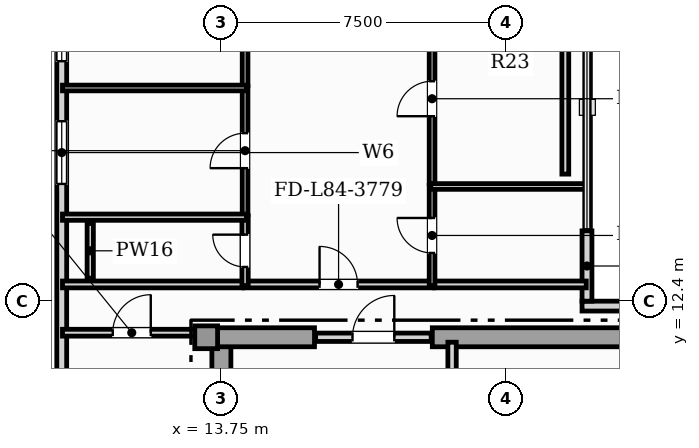
"""IFC4 building model, lengths in metres.
Left out: names, types, materials, properties, quantities, classifications, styles, units other than length and angle.
Written with IfcOpenShell. Run it as: python <this file> out.ifc"""

import sys

from ifc_helpers import new_model, si_unit, direction, frame, frame_2d, origin, origin_2d, place, context, subcontext, project, spatial, rectangle, extrude, element, fill, save


model = new_model("IFC4")
c1 = context("Model", 3, precision=1e-05, world=origin(), true_north=direction((0.0, 1.0)))
c2 = subcontext(c1, "Body", "Model", "MODEL_VIEW")
j1 = project(units=[si_unit("LENGTHUNIT", "METRE"), si_unit("PLANEANGLEUNIT", "RADIAN")], contexts=[c1])
p1 = place(None, origin())
s1 = spatial("IfcSite", under=j1, at=p1, CompositionType="ELEMENT")
p2 = place(p1, origin())
s2 = spatial("IfcBuilding", under=s1, at=p2, CompositionType="ELEMENT")
p3 = place(p2, frame((0.0, 0.0, 341.35)))
s3 = spatial("IfcBuildingStorey", under=s2, at=p3, CompositionType="ELEMENT", Elevation=341.35)
p4 = place(p3, frame((13.75, 0.92, 0.0), z_axis=(0.0, 0.0, 1.0), x_axis=(0.0, 1.0, 0.0)))
e1 = element("IfcWall", 1, at=p4, inside=s3, PredefinedType="SHEAR", context=c2, shape_type="SweptSolid", body=[
    extrude(rectangle(XDim=10.53, YDim=0.5, at=frame_2d((5.265, 0.0))), origin(), (0.0, 0.0, 1.0), 3.63),
])
p5 = place(p3, frame((13.25, 11.45, 0.0), z_axis=(0.0, 0.0, 1.0), x_axis=(1.0, 0.0, 0.0)))
e2 = element("IfcWall", 2, at=p5, inside=s3, PredefinedType="SHEAR", context=c2, shape_type="SweptSolid", body=[
    extrude(rectangle(XDim=2.95, YDim=0.5, at=frame_2d((1.475, 0.0))), origin(), (0.0, 0.0, 1.0), 3.63),
])
p6 = place(p3, frame((19.3, 11.45, 0.0), z_axis=(0.0, 0.0, 1.0), x_axis=(1.0, 0.0, 0.0)))
e3 = element("IfcWall", 3, at=p6, inside=s3, PredefinedType="SHEAR", context=c2, shape_type="SweptSolid", body=[
    extrude(rectangle(XDim=7.3, YDim=0.5, at=frame_2d((3.65, 0.0))), origin(), (0.0, 0.0, 1.0), 3.63),
])
p7 = place(p3, frame((13.35, 11.45, 0.0), z_axis=(0.0, 0.0, 1.0), x_axis=(1.0, 0.0, 0.0)))
e4 = element("IfcColumn", 4, at=p7, inside=s3, PredefinedType="COLUMN", context=c2, shape_type="SweptSolid", body=[
    extrude(rectangle(XDim=0.6, YDim=0.6, at=origin_2d()), origin(), (0.0, 0.0, 1.0), 3.85),
])
p8 = place(p3, frame((34.26, 12.27, 0.0), z_axis=(0.0, 0.0, 1.0), x_axis=(-1.0, 0.0, 0.0)))
e5 = element("IfcWall", 5, at=p8, inside=s3, PredefinedType="SOLIDWALL", context=c2, shape_type="SweptSolid", body=[
    extrude(rectangle(XDim=11.02, YDim=0.26, at=frame_2d((5.51, 0.0))), origin(), (0.0, 0.0, 1.0), 3.63),
])
p9 = place(p3, frame((23.37, 12.4, 0.0), z_axis=(0.0, 0.0, 1.0), x_axis=(0.0, 1.0, 0.0)))
e6 = element("IfcWall", 6, at=p9, inside=s3, PredefinedType="SOLIDWALL", context=c2, shape_type="SweptSolid", body=[
    extrude(rectangle(XDim=1.85, YDim=0.26, at=frame_2d((0.925, 0.0))), origin(), (0.0, 0.0, 1.0), 3.17),
])
p10 = place(p3, frame((9.55, 28.408, 0.0), z_axis=(0.0, 0.0, 1.0), x_axis=(0.0, -1.0, 0.0)))
e7 = element("IfcWall", 7, at=p10, inside=s3, PredefinedType="SOLIDWALL", context=c2, shape_type="SweptSolid", body=[
    extrude(rectangle(XDim=25.168, YDim=0.26, at=frame_2d((12.584, 0.0))), origin(), (0.0, 0.0, 1.0), 3.63),
])
p11 = place(p10, frame((19.503, 0.0, 0.88)))
e8 = element("IfcOpeningElement", 8, at=p11, cuts=e7, PredefinedType="OPENING", context=c2, shape_type="SweptSolid", body=[
    extrude(rectangle(XDim=1.65, YDim=2.0, at=frame_2d((0.825, 1.0))), frame((0.0, 0.14, 0.0), z_axis=(0.0, -1.0, 0.0), x_axis=(1.0, 0.0, 0.0)), (0.0, 0.0, 1.0), 0.28),
])
p12 = place(p10, frame((2.77, 0.0, 0.95)))
e9 = element("IfcOpeningElement", 9, at=p12, cuts=e7, PredefinedType="OPENING", context=c2, shape_type="SweptSolid", body=[
    extrude(rectangle(XDim=0.9, YDim=1.5, at=frame_2d((0.45, 0.75))), frame((0.0, 0.14, 0.0), z_axis=(0.0, -1.0, 0.0), x_axis=(1.0, 0.0, 0.0)), (0.0, 0.0, 1.0), 0.28),
])
p13 = place(p10, frame((11.274, 0.0, 0.88)))
e10 = element("IfcOpeningElement", 10, at=p13, cuts=e7, PredefinedType="OPENING", context=c2, shape_type="SweptSolid", body=[
    extrude(rectangle(XDim=1.65, YDim=2.0, at=frame_2d((0.825, 1.0))), frame((0.0, 0.14, 0.0), z_axis=(0.0, -1.0, 0.0), x_axis=(1.0, 0.0, 0.0)), (0.0, 0.0, 1.0), 0.28),
])
p14 = place(p10, frame((8.044, 0.0, 0.88)))
e11 = element("IfcOpeningElement", 11, at=p14, cuts=e7, PredefinedType="OPENING", context=c2, shape_type="SweptSolid", body=[
    extrude(rectangle(XDim=1.65, YDim=2.0, at=frame_2d((0.825, 1.0))), frame((0.0, 0.14, 0.0), z_axis=(0.0, -1.0, 0.0), x_axis=(1.0, 0.0, 0.0)), (0.0, 0.0, 1.0), 0.28),
])
p15 = place(p10, frame((4.815, 0.0, 0.88)))
e12 = element("IfcOpeningElement", 12, at=p15, cuts=e7, PredefinedType="OPENING", context=c2, shape_type="SweptSolid", body=[
    extrude(rectangle(XDim=1.65, YDim=2.0, at=frame_2d((0.825, 1.0))), frame((0.0, 0.14, 0.0), z_axis=(0.0, -1.0, 0.0), x_axis=(1.0, 0.0, 0.0)), (0.0, 0.0, 1.0), 0.28),
])
p16 = place(p3, frame((19.82, 8.52, 0.0), z_axis=(0.0, 0.0, 1.0), x_axis=(0.0, 1.0, 0.0)))
e13 = element("IfcWall", 13, at=p16, inside=s3, PredefinedType="SOLIDWALL", context=c2, shape_type="SweptSolid", body=[
    extrude(rectangle(XDim=2.8, YDim=0.22, at=frame_2d((1.4, 0.0))), origin(), (0.0, 0.0, 1.0), 3.085),
])
p17 = place(p16, frame((0.85, 0.0, 0.0)))
e14 = element("IfcOpeningElement", 14, at=p17, cuts=e13, PredefinedType="OPENING", context=c2, shape_type="SweptSolid", body=[
    extrude(rectangle(XDim=1.1, YDim=2.2, at=frame_2d((0.55, 1.1))), frame((0.0, 0.12, 0.0), z_axis=(0.0, -1.0, 0.0), x_axis=(1.0, 0.0, 0.0)), (0.0, 0.0, 1.0), 0.24),
])
p18 = place(p3, frame((16.23, 11.45, 0.0), z_axis=(0.0, 0.0, 1.0), x_axis=(1.0, 0.0, 0.0)))
e15 = element("IfcWall", 15, at=p18, inside=s3, PredefinedType="SOLIDWALL", context=c2, shape_type="SweptSolid", body=[
    extrude(rectangle(XDim=3.04, YDim=0.22, at=frame_2d((1.52, 0.0))), origin(), (0.0, 0.0, 1.0), 3.63),
])
p19 = place(p18, frame((0.97, 0.0, 0.0)))
e16 = element("IfcOpeningElement", 16, at=p19, cuts=e15, PredefinedType="OPENING", context=c2, shape_type="SweptSolid", body=[
    extrude(rectangle(XDim=1.1, YDim=2.2, at=frame_2d((0.55, 1.1))), frame((0.0, 0.12, 0.0), z_axis=(0.0, -1.0, 0.0), x_axis=(1.0, 0.0, 0.0)), (0.0, 0.0, 1.0), 0.24),
])
p20 = place(p3, frame((9.569, 11.57, 0.0), z_axis=(0.0, 0.0, 1.0), x_axis=(1.0, 0.0, 0.0)))
e17 = element("IfcWall", 17, at=p20, inside=s3, PredefinedType="PARTITIONING", context=c2, shape_type="SweptSolid", body=[
    extrude(rectangle(XDim=3.646, YDim=0.18, at=frame_2d((1.823, 0.0))), origin(), (0.0, 0.0, 1.0), 3.63),
])
p21 = place(p20, frame((1.323, 0.0, 0.0)))
e18 = element("IfcOpeningElement", 18, at=p21, cuts=e17, PredefinedType="OPENING", context=c2, shape_type="SweptSolid", body=[
    extrude(rectangle(XDim=1.0, YDim=2.15, at=frame_2d((0.5, 1.075))), frame((0.0, 0.1, 0.0), z_axis=(0.0, -1.0, 0.0), x_axis=(1.0, 0.0, 0.0)), (0.0, 0.0, 1.0), 0.2),
])
p22 = place(p3, frame((14.339, 12.84, 0.0), z_axis=(0.0, 0.0, 1.0), x_axis=(1.0, 0.0, 0.0)))
e19 = element("IfcWall", 19, at=p22, inside=s3, PredefinedType="PARTITIONING", context=c2, shape_type="SweptSolid", body=[
    extrude(rectangle(XDim=4.99, YDim=0.18, at=frame_2d((2.495, 0.0))), origin(), (0.0, 0.0, 1.0), 3.63),
])
p23 = place(p22, frame((1.995, 0.0, 0.0)))
e20 = element("IfcOpeningElement", 20, at=p23, cuts=e19, PredefinedType="OPENING", context=c2, shape_type="SweptSolid", body=[
    extrude(rectangle(XDim=1.0, YDim=2.15, at=frame_2d((0.5, 1.075))), frame((0.0, 0.1, 0.0), z_axis=(0.0, -1.0, 0.0), x_axis=(1.0, 0.0, 0.0)), (0.0, 0.0, 1.0), 0.2),
])
p24 = place(p3, frame((9.569, 12.84, 0.0), z_axis=(0.0, 0.0, 1.0), x_axis=(1.0, 0.0, 0.0)))
e21 = element("IfcWall", 21, at=p24, inside=s3, PredefinedType="PARTITIONING", context=c2, shape_type="SweptSolid", body=[
    extrude(rectangle(XDim=4.74, YDim=0.18, at=frame_2d((2.37, 0.0))), origin(), (0.0, 0.0, 1.0), 3.63),
])
p25 = place(p3, frame((19.359, 12.84, 0.0), z_axis=(0.0, 0.0, 1.0), x_axis=(1.0, 0.0, 0.0)))
e22 = element("IfcWall", 22, at=p25, inside=s3, PredefinedType="PARTITIONING", context=c2, shape_type="SweptSolid", body=[
    extrude(rectangle(XDim=3.992, YDim=0.18, at=frame_2d((1.996, 0.0))), origin(), (0.0, 0.0, 1.0), 3.63),
])
p26 = place(p3, frame((14.374, 12.805, 0.0), z_axis=(0.0, 0.0, 1.0), x_axis=(0.0, 1.0, 0.0)))
e23 = element("IfcWall", 23, at=p26, inside=s3, PredefinedType="PLUMBINGWALL", context=c2, shape_type="SweptSolid", body=[
    extrude(rectangle(XDim=1.84, YDim=0.165, at=frame_2d((0.92, 0.0))), origin(), (0.0, 0.0, 1.0), 3.63),
])
p27 = place(p26, frame((0.495, 0.0, 0.0)))
e24 = element("IfcOpeningElement", 24, at=p27, cuts=e23, PredefinedType="OPENING", context=c2, shape_type="SweptSolid", body=[
    extrude(rectangle(XDim=0.85, YDim=2.1, at=frame_2d((0.425, 1.05))), frame((0.0, 0.093, 0.0), z_axis=(0.0, -1.0, 0.0), x_axis=(1.0, 0.0, 0.0)), (0.0, 0.0, 1.0), 0.185),
])
p28 = place(p3, frame((14.374, 14.675, 0.0), z_axis=(0.0, 0.0, 1.0), x_axis=(0.0, 1.0, 0.0)))
e25 = element("IfcWall", 25, at=p28, inside=s3, PredefinedType="PARTITIONING", context=c2, shape_type="SweptSolid", body=[
    extrude(rectangle(XDim=3.369, YDim=0.15, at=frame_2d((1.685, 0.0))), origin(), (0.0, 0.0, 1.0), 3.63),
])
p29 = place(p28, frame((1.225, 0.0, 0.0)))
e26 = element("IfcOpeningElement", 26, at=p29, cuts=e25, PredefinedType="OPENING", context=c2, shape_type="SweptSolid", body=[
    extrude(rectangle(XDim=0.92, YDim=2.1, at=frame_2d((0.46, 1.05))), frame((0.0, 0.085, 0.0), z_axis=(0.0, -1.0, 0.0), x_axis=(1.0, 0.0, 0.0)), (0.0, 0.0, 1.0), 0.17),
])
p30 = place(p3, frame((14.374, 18.074, 0.0), z_axis=(0.0, 0.0, 1.0), x_axis=(0.0, 1.0, 0.0)))
e27 = element("IfcWall", 27, at=p30, inside=s3, PredefinedType="PARTITIONING", context=c2, shape_type="SweptSolid", body=[
    extrude(rectangle(XDim=3.03, YDim=0.15, at=frame_2d((1.515, 0.0))), origin(), (0.0, 0.0, 1.0), 3.63),
])
p31 = place(p30, frame((1.055, 0.0, 0.0)))
e28 = element("IfcOpeningElement", 28, at=p31, cuts=e27, PredefinedType="OPENING", context=c2, shape_type="SweptSolid", body=[
    extrude(rectangle(XDim=0.92, YDim=2.1, at=frame_2d((0.46, 1.05))), frame((0.0, 0.085, 0.0), z_axis=(0.0, -1.0, 0.0), x_axis=(1.0, 0.0, 0.0)), (0.0, 0.0, 1.0), 0.17),
])
p32 = place(p3, frame((19.294, 12.805, 0.0), z_axis=(0.0, 0.0, 1.0), x_axis=(0.0, 1.0, 0.0)))
e29 = element("IfcWall", 29, at=p32, inside=s3, PredefinedType="PARTITIONING", context=c2, shape_type="SweptSolid", body=[
    extrude(rectangle(XDim=2.648, YDim=0.15, at=frame_2d((1.324, 0.0))), origin(), (0.0, 0.0, 1.0), 3.63),
])
p33 = place(p32, frame((0.864, 0.0, 0.0)))
e30 = element("IfcOpeningElement", 30, at=p33, cuts=e29, PredefinedType="OPENING", context=c2, shape_type="SweptSolid", body=[
    extrude(rectangle(XDim=0.92, YDim=2.1, at=frame_2d((0.46, 1.05))), frame((0.0, 0.085, 0.0), z_axis=(0.0, -1.0, 0.0), x_axis=(1.0, 0.0, 0.0)), (0.0, 0.0, 1.0), 0.17),
])
p34 = place(p3, frame((19.294, 15.483, 0.0), z_axis=(0.0, 0.0, 1.0), x_axis=(0.0, 1.0, 0.0)))
e31 = element("IfcWall", 31, at=p34, inside=s3, PredefinedType="PARTITIONING", context=c2, shape_type="SweptSolid", body=[
    extrude(rectangle(XDim=4.488, YDim=0.15, at=frame_2d((2.244, 0.0))), origin(), (0.0, 0.0, 1.0), 3.63),
])
p35 = place(p34, frame((1.784, 0.0, 0.0)))
e32 = element("IfcOpeningElement", 32, at=p35, cuts=e31, PredefinedType="OPENING", context=c2, shape_type="SweptSolid", body=[
    extrude(rectangle(XDim=0.92, YDim=2.1, at=frame_2d((0.46, 1.05))), frame((0.0, 0.085, 0.0), z_axis=(0.0, -1.0, 0.0), x_axis=(1.0, 0.0, 0.0)), (0.0, 0.0, 1.0), 0.17),
])
p36 = place(p3, frame((9.569, 14.61, 0.0), z_axis=(0.0, 0.0, 1.0), x_axis=(1.0, 0.0, 0.0)))
e33 = element("IfcWall", 33, at=p36, inside=s3, PredefinedType="PLUMBINGWALL", context=c2, shape_type="SweptSolid", body=[
    extrude(rectangle(XDim=4.84, YDim=0.165, at=frame_2d((2.42, 0.0))), origin(), (0.0, 0.0, 1.0), 3.63),
])
p37 = place(p3, frame((9.569, 18.009, 0.0), z_axis=(0.0, 0.0, 1.0), x_axis=(1.0, 0.0, 0.0)))
e34 = element("IfcWall", 34, at=p37, inside=s3, PredefinedType="PARTITIONING", context=c2, shape_type="SweptSolid", body=[
    extrude(rectangle(XDim=4.84, YDim=0.15, at=frame_2d((2.42, 0.0))), origin(), (0.0, 0.0, 1.0), 3.63),
])
p38 = place(p3, frame((19.259, 15.417, 0.0), z_axis=(0.0, 0.0, 1.0), x_axis=(1.0, 0.0, 0.0)))
e35 = element("IfcWall", 35, at=p38, inside=s3, PredefinedType="PARTITIONING", context=c2, shape_type="SweptSolid", body=[
    extrude(rectangle(XDim=4.093, YDim=0.15, at=frame_2d((2.047, 0.0))), origin(), (0.0, 0.0, 1.0), 3.63),
])
p39 = place(p3, frame((10.3, 13.005, 0.0), z_axis=(0.0, 0.0, 1.0), x_axis=(0.0, 1.0, 0.0)))
e36 = element("IfcWall", 36, at=p39, inside=s3, PredefinedType="PLUMBINGWALL", context=c2, shape_type="SweptSolid", body=[
    extrude(rectangle(XDim=1.44, YDim=0.165, at=frame_2d((0.72, 0.0))), origin(), (0.0, 0.0, 1.0), 3.63),
])
p40 = place(p3, frame((22.8, 19.61, 0.0), z_axis=(0.0, 0.0, 1.0), x_axis=(0.0, -1.0, 0.0)))
e37 = element("IfcWall", 37, at=p40, inside=s3, PredefinedType="PARTITIONING", context=c2, shape_type="SweptSolid", body=[
    extrude(rectangle(XDim=3.867, YDim=0.18, at=frame_2d((1.934, 0.0))), origin(), (0.0, 0.0, 1.0), 3.63),
])
p41 = place(p13, origin())
e38 = element("IfcWindow", 38, at=p41, inside=s3, PartitioningType="SINGLE_PANEL", PredefinedType="WINDOW", context=c2, shape_type="SweptSolid", body=[
    extrude(rectangle(XDim=1.65, YDim=2.0, at=frame_2d((0.825, 1.0))), frame((0.0, 0.03, 0.0), z_axis=(0.0, -1.0, 0.0), x_axis=(1.0, 0.0, 0.0)), (0.0, 0.0, 1.0), 0.06),
])
fill(e10, e38)
p42 = place(p14, origin())
e39 = element("IfcWindow", 39, at=p42, inside=s3, PartitioningType="SINGLE_PANEL", PredefinedType="WINDOW", context=c2, shape_type="SweptSolid", body=[
    extrude(rectangle(XDim=1.65, YDim=2.0, at=frame_2d((0.825, 1.0))), frame((0.0, 0.03, 0.0), z_axis=(0.0, -1.0, 0.0), x_axis=(1.0, 0.0, 0.0)), (0.0, 0.0, 1.0), 0.06),
])
fill(e11, e39)
p43 = place(p19, origin())
e40 = element("IfcDoor", 40, at=p43, inside=s3, OperationType="SINGLE_SWING_RIGHT", PredefinedType="DOOR", context=c2, shape_type="SweptSolid", body=[
    extrude(rectangle(XDim=1.1, YDim=2.2, at=frame_2d((0.55, 1.1))), frame((0.0, 0.025, 0.0), z_axis=(0.0, -1.0, 0.0), x_axis=(1.0, 0.0, 0.0)), (0.0, 0.0, 1.0), 0.05),
])
fill(e16, e40)
p44 = place(p21, origin())
e41 = element("IfcDoor", 41, at=p44, inside=s3, OperationType="SINGLE_SWING_RIGHT", PredefinedType="DOOR", context=c2, shape_type="SweptSolid", body=[
    extrude(rectangle(XDim=1.0, YDim=2.15, at=frame_2d((0.5, 1.075))), frame((0.0, 0.025, 0.0), z_axis=(0.0, -1.0, 0.0), x_axis=(1.0, 0.0, 0.0)), (0.0, 0.0, 1.0), 0.05),
])
fill(e18, e41)
p45 = place(p23, origin())
e42 = element("IfcDoor", 42, at=p45, inside=s3, OperationType="SINGLE_SWING_LEFT", PredefinedType="DOOR", context=c2, shape_type="SweptSolid", body=[
    extrude(rectangle(XDim=1.0, YDim=2.15, at=frame_2d((0.5, 1.075))), frame((0.0, 0.025, 0.0), z_axis=(0.0, -1.0, 0.0), x_axis=(1.0, 0.0, 0.0)), (0.0, 0.0, 1.0), 0.05),
])
fill(e20, e42)
p46 = place(p27, origin())
e43 = element("IfcDoor", 43, at=p46, inside=s3, OperationType="SINGLE_SWING_RIGHT", PredefinedType="DOOR", context=c2, shape_type="SweptSolid", body=[
    extrude(rectangle(XDim=0.85, YDim=2.1, at=frame_2d((0.425, 1.05))), frame((0.0, 0.025, 0.0), z_axis=(0.0, -1.0, 0.0), x_axis=(1.0, 0.0, 0.0)), (0.0, 0.0, 1.0), 0.05),
])
fill(e24, e43)
p47 = place(p29, origin())
e44 = element("IfcDoor", 44, at=p47, inside=s3, OperationType="SINGLE_SWING_LEFT", PredefinedType="DOOR", context=c2, shape_type="SweptSolid", body=[
    extrude(rectangle(XDim=0.92, YDim=2.1, at=frame_2d((0.46, 1.05))), frame((0.0, 0.025, 0.0), z_axis=(0.0, -1.0, 0.0), x_axis=(1.0, 0.0, 0.0)), (0.0, 0.0, 1.0), 0.05),
])
fill(e26, e44)
p48 = place(p33, origin())
e45 = element("IfcDoor", 45, at=p48, inside=s3, OperationType="SINGLE_SWING_RIGHT", PredefinedType="DOOR", context=c2, shape_type="SweptSolid", body=[
    extrude(rectangle(XDim=0.92, YDim=2.1, at=frame_2d((0.46, 1.05))), frame((0.0, 0.025, 0.0), z_axis=(0.0, -1.0, 0.0), x_axis=(1.0, 0.0, 0.0)), (0.0, 0.0, 1.0), 0.05),
])
fill(e30, e45)
p49 = place(p35, origin())
e46 = element("IfcDoor", 46, at=p49, inside=s3, OperationType="SINGLE_SWING_LEFT", PredefinedType="DOOR", context=c2, shape_type="SweptSolid", body=[
    extrude(rectangle(XDim=0.92, YDim=2.1, at=frame_2d((0.46, 1.05))), frame((0.0, 0.025, 0.0), z_axis=(0.0, -1.0, 0.0), x_axis=(1.0, 0.0, 0.0)), (0.0, 0.0, 1.0), 0.05),
])
fill(e32, e46)
save(model, sys.argv[1])
